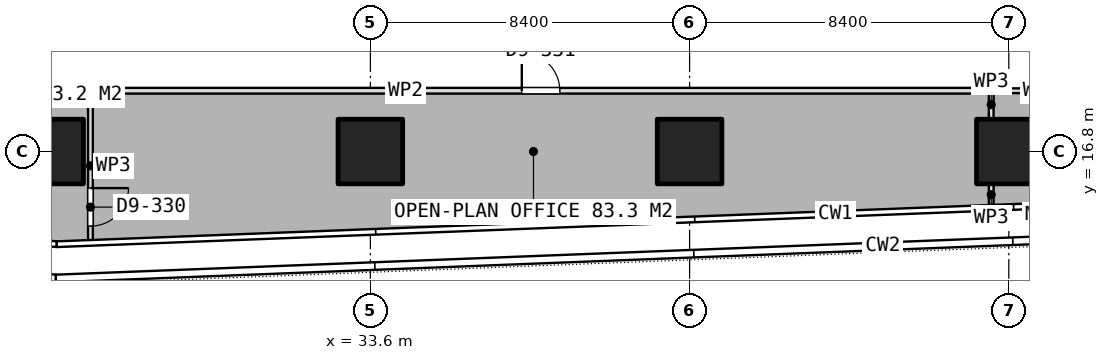
"""IFC4 building model, lengths in metres.
Left out: names, types, materials, properties, quantities, classifications, styles, units other than length and angle.
Written with IfcOpenShell. Run it as: python <this file> out.ifc"""

import sys

from ifc_helpers import new_model, si_unit, direction, frame, frame_2d, origin, origin_2d, place, context, subcontext, project, spatial, rectangle, extrude, element, fill, save


model = new_model("IFC4")
c1 = context("Model", 3, precision=1e-05, world=origin(), true_north=direction((0.0, 1.0)))
c2 = subcontext(c1, "Body", "Model", "MODEL_VIEW")
j1 = project(units=[si_unit("LENGTHUNIT", "METRE"), si_unit("PLANEANGLEUNIT", "RADIAN")], contexts=[c1])
p1 = place(None, origin())
s1 = spatial("IfcSite", under=j1, at=p1, CompositionType="ELEMENT")
p2 = place(p1, origin())
s2 = spatial("IfcBuilding", under=s1, at=p2, CompositionType="ELEMENT")
p3 = place(p2, frame((0.0, 0.0, 102.8)))
s3 = spatial("IfcBuildingStorey", under=s2, at=p3, CompositionType="ELEMENT", Elevation=102.8)
for number, where, z_axis, x_axis in (
    (1, (25.2, 16.8, 0.0), (0.0, 0.0, 1.0), (1.0, 0.0, 0.0)),
    (2, (33.6, 16.8, 0.0), (0.0, 0.0, 1.0), (1.0, 0.0, 0.0)),
    (3, (42.0, 16.8, 0.0), (0.0, 0.0, 1.0), (1.0, 0.0, 0.0)),
    (4, (50.4, 16.8, 0.0), (0.0, 0.0, 1.0), (1.0, 0.0, 0.0)),
):
    element("IfcColumn", number, at=place(p3, frame(where, z_axis=z_axis, x_axis=x_axis)), inside=s3, PredefinedType="COLUMN", context=c2, shape_type="SweptSolid", body=[
        extrude(rectangle(XDim=1.7, YDim=1.7, at=origin_2d()), origin(), (0.0, 0.0, 1.0), 3.75),
    ])
p4 = place(p3, frame((49.937, 18.4, 0.0), z_axis=(0.0, 0.0, 1.0), x_axis=(1.0, 0.0, 0.0)))
e5 = element("IfcWall", 5, at=p4, inside=s3, PredefinedType="PARTITIONING", context=c2, shape_type="SweptSolid", body=[
    extrude(rectangle(XDim=6.463, YDim=0.125, at=frame_2d((3.231, 0.0))), origin(), (0.0, 0.0, 1.0), 3.5),
])
p5 = place(p4, frame((2.731, 0.0, 0.0)))
e6 = element("IfcOpeningElement", 6, at=p5, cuts=e5, PredefinedType="OPENING", context=c2, shape_type="SweptSolid", body=[
    extrude(rectangle(XDim=1.0, YDim=2.1, at=frame_2d((0.5, 1.05))), frame((0.0, 0.073, 0.0), z_axis=(0.0, -1.0, 0.0), x_axis=(1.0, 0.0, 0.0)), (0.0, 0.0, 1.0), 0.145),
])
p6 = place(p3, frame((49.937, 15.399, 0.0), z_axis=(0.0, 0.0, 1.0), x_axis=(0.0, 1.0, 0.0)))
e7 = element("IfcWall", 7, at=p6, inside=s3, PredefinedType="PARTITIONING", context=c2, shape_type="SweptSolid", body=[
    extrude(rectangle(XDim=0.531, YDim=0.125, at=frame_2d((0.266, 0.0))), origin(), (0.0, 0.0, 1.0), 3.5),
])
p7 = place(p3, frame((49.937, 17.67, 0.0), z_axis=(0.0, 0.0, 1.0), x_axis=(0.0, 1.0, 0.0)))
e8 = element("IfcWall", 8, at=p7, inside=s3, PredefinedType="PARTITIONING", context=c2, shape_type="SweptSolid", body=[
    extrude(rectangle(XDim=0.73, YDim=0.125, at=frame_2d((0.365, 0.0))), origin(), (0.0, 0.0, 1.0), 3.5),
])
p8 = place(p3, frame((19.2, 18.4, 0.0), z_axis=(0.0, 0.0, 1.0), x_axis=(1.0, 0.0, 0.0)))
e9 = element("IfcWall", 9, at=p8, inside=s3, PredefinedType="PARTITIONING", context=c2, shape_type="SweptSolid", body=[
    extrude(rectangle(XDim=7.034, YDim=0.125, at=frame_2d((3.517, 0.0))), origin(), (0.0, 0.0, 1.0), 3.5),
])
p9 = place(p3, frame((26.234, 18.4, 0.0), z_axis=(0.0, 0.0, 1.0), x_axis=(0.0, -1.0, 0.0)))
e10 = element("IfcWall", 10, at=p9, inside=s3, PredefinedType="PARTITIONING", context=c2, shape_type="SweptSolid", body=[
    extrude(rectangle(XDim=3.954, YDim=0.125, at=frame_2d((1.977, 0.0))), origin(), (0.0, 0.0, 1.0), 3.5),
])
p10 = place(p9, frame((2.562, 0.0, 0.0)))
e11 = element("IfcOpeningElement", 11, at=p10, cuts=e10, PredefinedType="OPENING", context=c2, shape_type="SweptSolid", body=[
    extrude(rectangle(XDim=1.0, YDim=2.1, at=frame_2d((0.5, 1.05))), frame((0.0, 0.073, 0.0), z_axis=(0.0, -1.0, 0.0), x_axis=(1.0, 0.0, 0.0)), (0.0, 0.0, 1.0), 0.145),
])
p11 = place(p3, frame((26.234, 18.4, 0.0), z_axis=(0.0, 0.0, 1.0), x_axis=(1.0, 0.0, 0.0)))
e12 = element("IfcWall", 12, at=p11, inside=s3, PredefinedType="PARTITIONING", context=c2, shape_type="SweptSolid", body=[
    extrude(rectangle(XDim=23.702, YDim=0.15, at=frame_2d((11.851, 0.0))), origin(), (0.0, 0.0, 1.0), 3.5),
])
p12 = place(p11, frame((11.351, 0.0, 0.0)))
e13 = element("IfcOpeningElement", 13, at=p12, cuts=e12, PredefinedType="OPENING", context=c2, shape_type="SweptSolid", body=[
    extrude(rectangle(XDim=1.0, YDim=2.1, at=frame_2d((0.5, 1.05))), frame((0.0, 0.085, 0.0), z_axis=(0.0, -1.0, 0.0), x_axis=(1.0, 0.0, 0.0)), (0.0, 0.0, 1.0), 0.17),
])
p13 = place(p10, origin())
e14 = element("IfcDoor", 14, at=p13, inside=s3, OperationType="SINGLE_SWING_LEFT", PredefinedType="DOOR", context=c2, shape_type="SweptSolid", body=[
    extrude(rectangle(XDim=1.0, YDim=2.1, at=frame_2d((0.5, 1.05))), frame((0.0, 0.025, 0.0), z_axis=(0.0, -1.0, 0.0), x_axis=(1.0, 0.0, 0.0)), (0.0, 0.0, 1.0), 0.05),
])
fill(e11, e14)
p14 = place(p12, origin())
e15 = element("IfcDoor", 15, at=p14, inside=s3, OperationType="SINGLE_SWING_LEFT", PredefinedType="DOOR", context=c2, shape_type="SweptSolid", body=[
    extrude(rectangle(XDim=1.0, YDim=2.1, at=frame_2d((0.5, 1.05))), frame((0.0, 0.025, 0.0), z_axis=(0.0, -1.0, 0.0), x_axis=(1.0, 0.0, 0.0)), (0.0, 0.0, 1.0), 0.05),
])
fill(e13, e15)
save(model, sys.argv[1])
